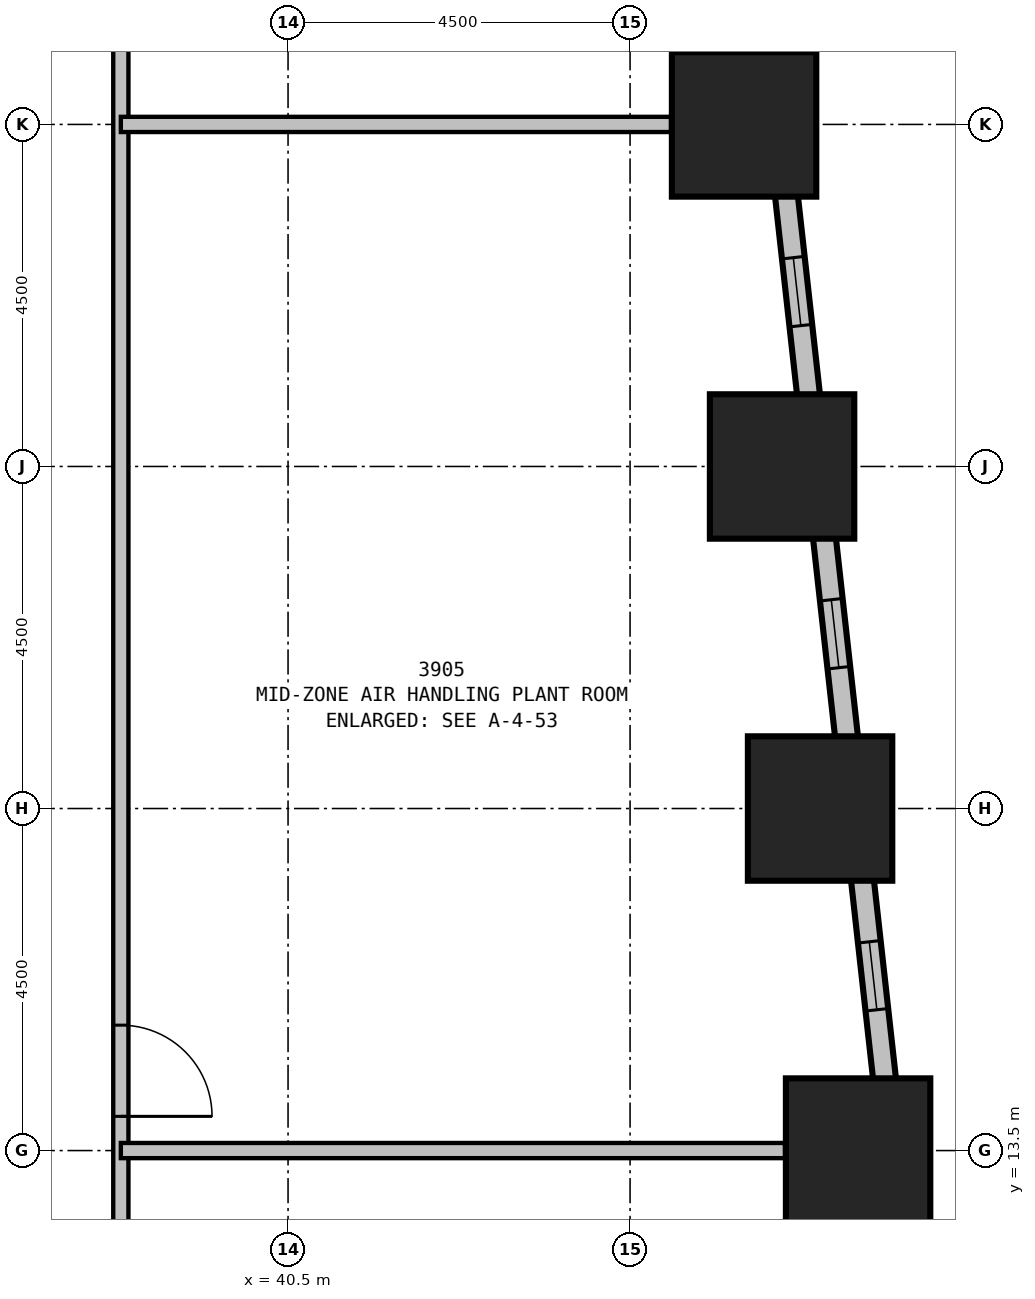
"""IFC4 building model, lengths in metres.
Left out: names, types, materials, properties, quantities, classifications, styles, units other than length and angle.
Written with IfcOpenShell. Run it as: python <this file> out.ifc"""

import sys

from ifc_helpers import new_model, si_unit, direction, frame, frame_2d, origin, origin_2d, place, context, subcontext, project, spatial, rectangle, extrude, element, fill, save


model = new_model("IFC4")
c1 = context("Model", 3, precision=1e-05, world=origin(), true_north=direction((0.0, 1.0)))
c2 = subcontext(c1, "Body", "Model", "MODEL_VIEW")
j1 = project(units=[si_unit("LENGTHUNIT", "METRE"), si_unit("PLANEANGLEUNIT", "RADIAN")], contexts=[c1])
p1 = place(None, origin())
s1 = spatial("IfcSite", under=j1, at=p1, CompositionType="ELEMENT")
p2 = place(p1, origin())
s2 = spatial("IfcBuilding", under=s1, at=p2, CompositionType="ELEMENT")
p3 = place(p2, frame((0.0, 0.0, 151.9)))
s3 = spatial("IfcBuildingStorey", under=s2, at=p3, CompositionType="ELEMENT", Elevation=151.9)
for number, where, z_axis, x_axis in (
    (1, (48.0, 13.5, 0.0), (0.0, 0.0, 1.0), (1.0, 0.0, 0.0)),
    (2, (47.5, 18.0, 0.0), (0.0, 0.0, 1.0), (1.0, 0.0, 0.0)),
    (3, (47.0, 22.5, 0.0), (0.0, 0.0, 1.0), (1.0, 0.0, 0.0)),
    (4, (46.5, 27.0, 0.0), (0.0, 0.0, 1.0), (1.0, 0.0, 0.0)),
):
    element("IfcColumn", number, at=place(p3, frame(where, z_axis=z_axis, x_axis=x_axis)), inside=s3, PredefinedType="COLUMN", context=c2, shape_type="SweptSolid", body=[
        extrude(rectangle(XDim=1.9, YDim=1.9, at=origin_2d()), origin(), (0.0, 0.0, 1.0), 6.0),
    ])
p4 = place(p3, frame((49.519, 3.901, 0.0), z_axis=(0.0, 0.0, 1.0), x_axis=(-0.110429082637, 0.993884006164, 0.0)))
e5 = element("IfcWall", 5, at=p4, inside=s3, PredefinedType="STANDARD", context=c2, shape_type="SweptSolid", body=[
    extrude(rectangle(XDim=32.899, YDim=0.3, at=frame_2d((16.45, 0.0))), origin(), (0.0, 0.0, 1.0), 3.35),
])
p5 = place(p4, frame((2.467, 0.0, 0.5)))
e6 = element("IfcOpeningElement", 6, at=p5, cuts=e5, PredefinedType="OPENING", context=c2, shape_type="SweptSolid", body=[
    extrude(rectangle(XDim=0.9, YDim=1.2, at=frame_2d((0.45, 0.6))), frame((0.0, 0.16, 0.0), z_axis=(0.0, -1.0, 0.0), x_axis=(1.0, 0.0, 0.0)), (0.0, 0.0, 1.0), 0.32),
])
p6 = place(p4, frame((6.995, 0.0, 0.5)))
e7 = element("IfcOpeningElement", 7, at=p6, cuts=e5, PredefinedType="OPENING", context=c2, shape_type="SweptSolid", body=[
    extrude(rectangle(XDim=0.9, YDim=1.2, at=frame_2d((0.45, 0.6))), frame((0.0, 0.16, 0.0), z_axis=(0.0, -1.0, 0.0), x_axis=(1.0, 0.0, 0.0)), (0.0, 0.0, 1.0), 0.32),
])
p7 = place(p4, frame((11.522, 0.0, 0.5)))
e8 = element("IfcOpeningElement", 8, at=p7, cuts=e5, PredefinedType="OPENING", context=c2, shape_type="SweptSolid", body=[
    extrude(rectangle(XDim=0.9, YDim=1.2, at=frame_2d((0.45, 0.6))), frame((0.0, 0.16, 0.0), z_axis=(0.0, -1.0, 0.0), x_axis=(1.0, 0.0, 0.0)), (0.0, 0.0, 1.0), 0.32),
])
p8 = place(p4, frame((16.05, 0.0, 0.5)))
e9 = element("IfcOpeningElement", 9, at=p8, cuts=e5, PredefinedType="OPENING", context=c2, shape_type="SweptSolid", body=[
    extrude(rectangle(XDim=0.9, YDim=1.2, at=frame_2d((0.45, 0.6))), frame((0.0, 0.16, 0.0), z_axis=(0.0, -1.0, 0.0), x_axis=(1.0, 0.0, 0.0)), (0.0, 0.0, 1.0), 0.32),
])
p9 = place(p4, frame((20.578, 0.0, 0.5)))
e10 = element("IfcOpeningElement", 10, at=p9, cuts=e5, PredefinedType="OPENING", context=c2, shape_type="SweptSolid", body=[
    extrude(rectangle(XDim=0.9, YDim=1.2, at=frame_2d((0.45, 0.6))), frame((0.0, 0.16, 0.0), z_axis=(0.0, -1.0, 0.0), x_axis=(1.0, 0.0, 0.0)), (0.0, 0.0, 1.0), 0.32),
])
p10 = place(p4, frame((25.105, 0.0, 0.5)))
e11 = element("IfcOpeningElement", 11, at=p10, cuts=e5, PredefinedType="OPENING", context=c2, shape_type="SweptSolid", body=[
    extrude(rectangle(XDim=0.9, YDim=1.2, at=frame_2d((0.45, 0.6))), frame((0.0, 0.16, 0.0), z_axis=(0.0, -1.0, 0.0), x_axis=(1.0, 0.0, 0.0)), (0.0, 0.0, 1.0), 0.32),
])
p11 = place(p4, frame((29.633, 0.0, 0.5)))
e12 = element("IfcOpeningElement", 12, at=p11, cuts=e5, PredefinedType="OPENING", context=c2, shape_type="SweptSolid", body=[
    extrude(rectangle(XDim=0.9, YDim=1.2, at=frame_2d((0.45, 0.6))), frame((0.0, 0.16, 0.0), z_axis=(0.0, -1.0, 0.0), x_axis=(1.0, 0.0, 0.0)), (0.0, 0.0, 1.0), 0.32),
])
p12 = place(p3, frame((38.3, 11.2, 0.0), z_axis=(0.0, 0.0, 1.0), x_axis=(0.0, 1.0, 0.0)))
e13 = element("IfcWall", 13, at=p12, inside=s3, PredefinedType="PARTITIONING", context=c2, shape_type="SweptSolid", body=[
    extrude(rectangle(XDim=18.1, YDim=0.2, at=frame_2d((9.05, 0.0))), origin(), (0.0, 0.0, 1.0), 5.75),
])
p13 = place(p12, frame((3.95, 0.0, 0.0), z_axis=(0.0, 0.0, 1.0), x_axis=(-1.0, 0.0, 0.0)))
e14 = element("IfcOpeningElement", 14, at=p13, cuts=e13, PredefinedType="OPENING", context=c2, shape_type="SweptSolid", body=[
    extrude(rectangle(XDim=1.2, YDim=2.1, at=frame_2d((0.6, 1.05))), frame((0.0, 0.11, 0.0), z_axis=(0.0, -1.0, 0.0), x_axis=(1.0, 0.0, 0.0)), (0.0, 0.0, 1.0), 0.22),
])
p14 = place(p3, frame((38.3, 13.5, 0.0), z_axis=(0.0, 0.0, 1.0), x_axis=(1.0, 0.0, 0.0)))
e15 = element("IfcWall", 15, at=p14, inside=s3, PredefinedType="PARTITIONING", context=c2, shape_type="SweptSolid", body=[
    extrude(rectangle(XDim=8.739, YDim=0.2, at=frame_2d((4.37, 0.0))), origin(), (0.0, 0.0, 1.0), 4.45),
])
p15 = place(p3, frame((38.3, 27.0, 0.0), z_axis=(0.0, 0.0, 1.0), x_axis=(1.0, 0.0, 0.0)))
e16 = element("IfcWall", 16, at=p15, inside=s3, PredefinedType="PARTITIONING", context=c2, shape_type="SweptSolid", body=[
    extrude(rectangle(XDim=7.239, YDim=0.2, at=frame_2d((3.62, 0.0))), origin(), (0.0, 0.0, 1.0), 4.45),
])
p16 = place(p7, origin())
e17 = element("IfcWindow", 17, at=p16, inside=s3, PartitioningType="SINGLE_PANEL", PredefinedType="USERDEFINED", context=c2, shape_type="SweptSolid", body=[
    extrude(rectangle(XDim=0.9, YDim=1.2, at=frame_2d((0.45, 0.6))), frame((0.0, 0.03, 0.0), z_axis=(0.0, -1.0, 0.0), x_axis=(1.0, 0.0, 0.0)), (0.0, 0.0, 1.0), 0.06),
])
fill(e8, e17)
p17 = place(p8, origin())
e18 = element("IfcWindow", 18, at=p17, inside=s3, PartitioningType="SINGLE_PANEL", PredefinedType="USERDEFINED", context=c2, shape_type="SweptSolid", body=[
    extrude(rectangle(XDim=0.9, YDim=1.2, at=frame_2d((0.45, 0.6))), frame((0.0, 0.03, 0.0), z_axis=(0.0, -1.0, 0.0), x_axis=(1.0, 0.0, 0.0)), (0.0, 0.0, 1.0), 0.06),
])
fill(e9, e18)
p18 = place(p9, origin())
e19 = element("IfcWindow", 19, at=p18, inside=s3, PartitioningType="SINGLE_PANEL", PredefinedType="USERDEFINED", context=c2, shape_type="SweptSolid", body=[
    extrude(rectangle(XDim=0.9, YDim=1.2, at=frame_2d((0.45, 0.6))), frame((0.0, 0.03, 0.0), z_axis=(0.0, -1.0, 0.0), x_axis=(1.0, 0.0, 0.0)), (0.0, 0.0, 1.0), 0.06),
])
fill(e10, e19)
p19 = place(p13, origin())
e20 = element("IfcDoor", 20, at=p19, inside=s3, OperationType="SINGLE_SWING_RIGHT", PredefinedType="DOOR", context=c2, shape_type="SweptSolid", body=[
    extrude(rectangle(XDim=1.2, YDim=2.1, at=frame_2d((0.6, 1.05))), frame((0.0, 0.025, 0.0), z_axis=(0.0, -1.0, 0.0), x_axis=(1.0, 0.0, 0.0)), (0.0, 0.0, 1.0), 0.05),
])
fill(e14, e20)
save(model, sys.argv[1])
